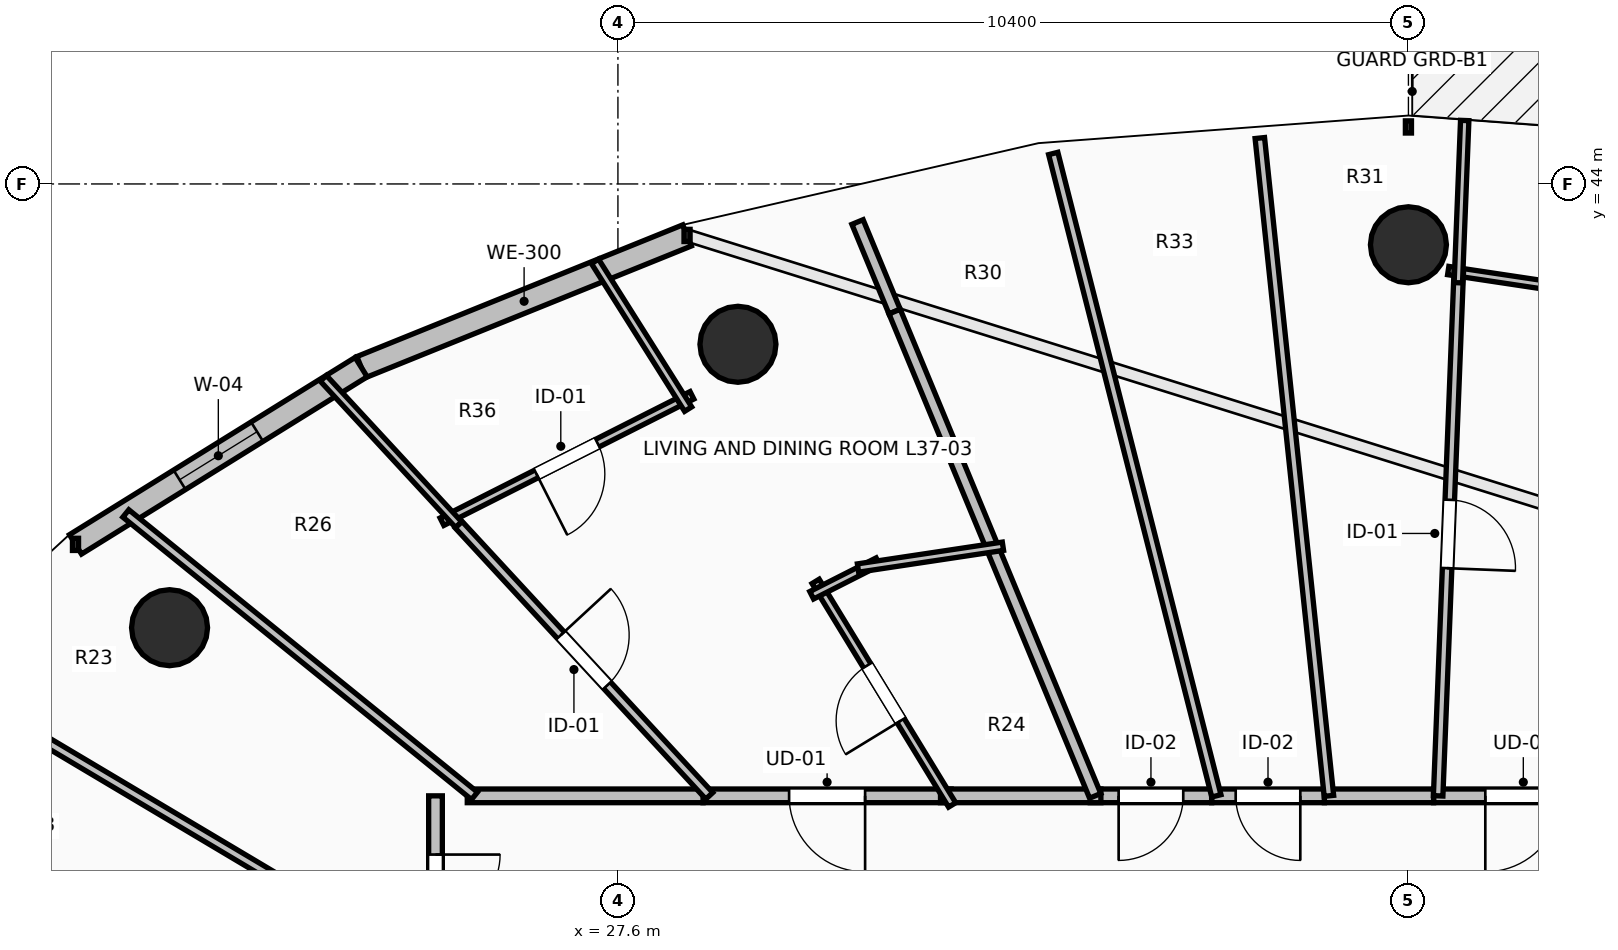
"""IFC4 building model, lengths in metres.
Left out: names, types, materials, properties, quantities, classifications, styles, units other than length and angle.
Written with IfcOpenShell. Run it as: python <this file> out.ifc"""

import sys

from ifc_helpers import new_model, si_unit, direction, frame, frame_2d, origin, origin_2d, place, context, subcontext, project, spatial, rectangle, circle, extrude, element, fill, save


model = new_model("IFC4")
c1 = context("Model", 3, precision=1e-05, world=origin(), true_north=direction((0.0, 1.0)))
c2 = subcontext(c1, "Body", "Model", "MODEL_VIEW")
j1 = project(units=[si_unit("LENGTHUNIT", "METRE"), si_unit("PLANEANGLEUNIT", "RADIAN")], contexts=[c1])
p1 = place(None, origin())
s1 = spatial("IfcSite", under=j1, at=p1, CompositionType="ELEMENT")
p2 = place(p1, origin())
s2 = spatial("IfcBuilding", under=s1, at=p2, CompositionType="ELEMENT")
p3 = place(p2, frame((0.0, 0.0, 139.6)))
s3 = spatial("IfcBuildingStorey", under=s2, at=p3, CompositionType="ELEMENT", Elevation=139.6)
for number, where, z_axis, x_axis in (
    (1, (38.0, 43.2, 0.0), (0.0, 0.0, 1.0), (0.0, 1.0, 0.0)),
    (2, (29.179, 41.891, 0.0), (0.0, 0.0, 1.0), (-0.383, 0.924, 0.0)),
    (3, (21.701, 38.162, 0.0), (0.0, 0.0, 1.0), (-0.707, 0.707, 0.0)),
):
    element("IfcColumn", number, at=place(p3, frame(where, z_axis=z_axis, x_axis=x_axis)), inside=s3, PredefinedType="COLUMN", context=c2, shape_type="SweptSolid", body=[
        extrude(circle(Radius=0.5, at=origin_2d()), origin(), (0.0, 0.0, 1.0), 3.5),
    ])
p4 = place(p3, frame((28.51, 43.323, 0.0), z_axis=(0.0, 0.0, 1.0), x_axis=(-0.927156504392, -0.374674280359, 0.0)))
e4 = element("IfcWall", 4, at=p4, inside=s3, PredefinedType="STANDARD", context=c2, shape_type="SweptSolid", body=[
    extrude(rectangle(XDim=4.625, YDim=0.3, at=frame_2d((2.312, 0.0))), origin(), (0.0, 0.0, 1.0), 3.24),
])
p5 = place(p3, frame((24.222, 41.59, 0.0), z_axis=(0.0, 0.0, 1.0), x_axis=(-0.849721181976, -0.527232313977, 0.0)))
e5 = element("IfcWall", 5, at=p5, inside=s3, PredefinedType="STANDARD", context=c2, shape_type="SweptSolid", body=[
    extrude(rectangle(XDim=4.423, YDim=0.3, at=frame_2d((2.211, 0.0))), origin(), (0.0, 0.0, 1.0), 3.24),
])
p6 = place(p5, frame((1.611, 0.0, 0.85)))
e6 = element("IfcOpeningElement", 6, at=p6, cuts=e5, PredefinedType="OPENING", context=c2, shape_type="SweptSolid", body=[
    extrude(rectangle(XDim=1.2, YDim=1.95, at=frame_2d((0.6, 0.975))), frame((0.0, 0.165, 0.0), z_axis=(0.0, -1.0, 0.0), x_axis=(1.0, 0.0, 0.0)), (0.0, 0.0, 1.0), 0.33),
])
p7 = place(p3, frame((40.692, 35.95, 0.0), z_axis=(0.0, 0.0, 1.0), x_axis=(-1.0, 0.0, 0.0)))
e7 = element("IfcWall", 7, at=p7, inside=s3, PredefinedType="PARTITIONING", context=c2, shape_type="SweptSolid", body=[
    extrude(rectangle(XDim=2.361, YDim=0.18, at=frame_2d((1.18, 0.0))), origin(), (0.0, 0.0, 1.0), 3.24),
])
p8 = place(p7, frame((0.68, 0.0, 0.0)))
e8 = element("IfcOpeningElement", 8, at=p8, cuts=e7, PredefinedType="OPENING", context=c2, shape_type="SweptSolid", body=[
    extrude(rectangle(XDim=1.0, YDim=2.15, at=frame_2d((0.5, 1.075))), frame((0.0, 0.105, 0.0), z_axis=(0.0, -1.0, 0.0), x_axis=(1.0, 0.0, 0.0)), (0.0, 0.0, 1.0), 0.21),
])
p9 = place(p3, frame((38.331, 35.95, 0.0), z_axis=(0.0, 0.0, 1.0), x_axis=(-1.0, 0.0, 0.0)))
e9 = element("IfcWall", 9, at=p9, inside=s3, PredefinedType="PARTITIONING", context=c2, shape_type="SweptSolid", body=[
    extrude(rectangle(XDim=1.437, YDim=0.18, at=frame_2d((0.719, 0.0))), origin(), (0.0, 0.0, 1.0), 3.24),
])
p10 = place(p3, frame((36.894, 35.95, 0.0), z_axis=(0.0, 0.0, 1.0), x_axis=(-1.0, 0.0, 0.0)))
e10 = element("IfcWall", 10, at=p10, inside=s3, PredefinedType="PARTITIONING", context=c2, shape_type="SweptSolid", body=[
    extrude(rectangle(XDim=1.483, YDim=0.18, at=frame_2d((0.742, 0.0))), origin(), (0.0, 0.0, 1.0), 3.24),
])
p11 = place(p10, frame((0.316, 0.0, 0.0)))
e11 = element("IfcOpeningElement", 11, at=p11, cuts=e10, PredefinedType="OPENING", context=c2, shape_type="SweptSolid", body=[
    extrude(rectangle(XDim=0.85, YDim=2.1, at=frame_2d((0.425, 1.05))), frame((0.0, 0.105, 0.0), z_axis=(0.0, -1.0, 0.0), x_axis=(1.0, 0.0, 0.0)), (0.0, 0.0, 1.0), 0.21),
])
p12 = place(p3, frame((35.411, 35.95, 0.0), z_axis=(0.0, 0.0, 1.0), x_axis=(-1.0, 0.0, 0.0)))
e12 = element("IfcWall", 12, at=p12, inside=s3, PredefinedType="PARTITIONING", context=c2, shape_type="SweptSolid", body=[
    extrude(rectangle(XDim=1.597, YDim=0.18, at=frame_2d((0.798, 0.0))), origin(), (0.0, 0.0, 1.0), 3.24),
])
p13 = place(p12, frame((0.374, 0.0, 0.0)))
e13 = element("IfcOpeningElement", 13, at=p13, cuts=e12, PredefinedType="OPENING", context=c2, shape_type="SweptSolid", body=[
    extrude(rectangle(XDim=0.85, YDim=2.1, at=frame_2d((0.425, 1.05))), frame((0.0, 0.105, 0.0), z_axis=(0.0, -1.0, 0.0), x_axis=(1.0, 0.0, 0.0)), (0.0, 0.0, 1.0), 0.21),
])
p14 = place(p3, frame((31.984, 35.95, 0.0), z_axis=(0.0, 0.0, 1.0), x_axis=(-1.0, 0.0, 0.0)))
e14 = element("IfcWall", 14, at=p14, inside=s3, PredefinedType="PARTITIONING", context=c2, shape_type="SweptSolid", body=[
    extrude(rectangle(XDim=3.264, YDim=0.18, at=frame_2d((1.632, 0.0))), origin(), (0.0, 0.0, 1.0), 2.432),
])
p15 = place(p14, frame((1.132, 0.0, 0.0)))
e15 = element("IfcOpeningElement", 15, at=p15, cuts=e14, PredefinedType="OPENING", context=c2, shape_type="SweptSolid", body=[
    extrude(rectangle(XDim=1.0, YDim=2.15, at=frame_2d((0.5, 1.075))), frame((0.0, 0.105, 0.0), z_axis=(0.0, -1.0, 0.0), x_axis=(1.0, 0.0, 0.0)), (0.0, 0.0, 1.0), 0.21),
])
p16 = place(p3, frame((33.954, 35.95, 0.0), z_axis=(0.0, 0.0, 1.0), x_axis=(-1.0, 0.0, 0.0)))
e16 = element("IfcWall", 16, at=p16, inside=s3, PredefinedType="PARTITIONING", context=c2, shape_type="SweptSolid", body=[
    extrude(rectangle(XDim=2.11, YDim=0.18, at=frame_2d((1.055, 0.0))), origin(), (0.0, 0.0, 1.0), 3.24),
])
p17 = place(p3, frame((28.72, 35.95, 0.0), z_axis=(0.0, 0.0, 1.0), x_axis=(-1.0, 0.0, 0.0)))
e17 = element("IfcWall", 17, at=p17, inside=s3, PredefinedType="PARTITIONING", context=c2, shape_type="SweptSolid", body=[
    extrude(rectangle(XDim=3.102, YDim=0.18, at=frame_2d((1.551, 0.0))), origin(), (0.0, 0.0, 1.0), 2.432),
])
p18 = place(p3, frame((25.2, 35.95, 0.0), z_axis=(0.0, 0.0, 1.0), x_axis=(0.0, -1.0, 0.0)))
e18 = element("IfcWall", 18, at=p18, inside=s3, PredefinedType="PARTITIONING", context=c2, shape_type="SweptSolid", body=[
    extrude(rectangle(XDim=2.395, YDim=0.18, at=frame_2d((1.198, 0.0))), origin(), (0.0, 0.0, 1.0), 2.432),
])
p19 = place(p18, frame((0.772, 0.0, 0.0)))
e19 = element("IfcOpeningElement", 19, at=p19, cuts=e18, PredefinedType="OPENING", context=c2, shape_type="SweptSolid", body=[
    extrude(rectangle(XDim=0.85, YDim=2.1, at=frame_2d((0.425, 1.05))), frame((0.0, 0.105, 0.0), z_axis=(0.0, -1.0, 0.0), x_axis=(1.0, 0.0, 0.0)), (0.0, 0.0, 1.0), 0.21),
])
p20 = place(p3, frame((41.854, 42.36, 0.0), z_axis=(0.0, 0.0, 1.0), x_axis=(-0.988887919082, 0.148662986296, 0.0)))
e20 = element("IfcWall", 20, at=p20, inside=s3, PredefinedType="PARTITIONING", context=c2, shape_type="SweptSolid", body=[
    extrude(rectangle(XDim=3.368, YDim=0.11, at=frame_2d((1.684, 0.0))), origin(), (0.0, 0.0, 1.0), 3.24),
])
p21 = place(p20, frame((1.234, 0.0, 0.0)))
e21 = element("IfcOpeningElement", 21, at=p21, cuts=e20, PredefinedType="OPENING", context=c2, shape_type="SweptSolid", body=[
    extrude(rectangle(XDim=0.9, YDim=2.1, at=frame_2d((0.45, 1.05))), frame((0.0, 0.07, 0.0), z_axis=(0.0, -1.0, 0.0), x_axis=(1.0, 0.0, 0.0)), (0.0, 0.0, 1.0), 0.14),
])
p22 = place(p3, frame((38.662, 42.84, 0.0), z_axis=(0.0, 0.0, 1.0), x_axis=(-0.039300632457, -0.999227431713, 0.0)))
e22 = element("IfcWall", 22, at=p22, inside=s3, PredefinedType="PARTITIONING", context=c2, shape_type="SweptSolid", body=[
    extrude(rectangle(XDim=6.896, YDim=0.125, at=frame_2d((3.448, 0.0))), origin(), (0.0, 0.0, 1.0), 2.922),
])
p23 = place(p22, frame((2.998, 0.0, 0.0)))
e23 = element("IfcOpeningElement", 23, at=p23, cuts=e22, PredefinedType="OPENING", context=c2, shape_type="SweptSolid", body=[
    extrude(rectangle(XDim=0.9, YDim=2.1, at=frame_2d((0.45, 1.05))), frame((0.0, 0.077, 0.0), z_axis=(0.0, -1.0, 0.0), x_axis=(1.0, 0.0, 0.0)), (0.0, 0.0, 1.0), 0.155),
])
p24 = place(p3, frame((38.74, 44.835, 0.0), z_axis=(0.0, 0.0, 1.0), x_axis=(-0.039310852952, -0.999227029679, 0.0)))
e24 = element("IfcWall", 24, at=p24, inside=s3, PredefinedType="PARTITIONING", context=c2, shape_type="SweptSolid", body=[
    extrude(rectangle(XDim=2.136, YDim=0.11, at=frame_2d((1.068, 0.0))), origin(), (0.0, 0.0, 1.0), 2.728),
])
p25 = place(p3, frame((36.045, 44.604, 0.0), z_axis=(0.0, 0.0, 1.0), x_axis=(0.104483235172, -0.994526647993, 0.0)))
e25 = element("IfcWall", 25, at=p25, inside=s3, PredefinedType="PARTITIONING", context=c2, shape_type="SweptSolid", body=[
    extrude(rectangle(XDim=8.702, YDim=0.125, at=frame_2d((4.351, 0.0))), origin(), (0.0, 0.0, 1.0), 2.432),
])
p26 = place(p3, frame((33.327, 44.401, 0.0), z_axis=(0.0, 0.0, 1.0), x_axis=(0.246124619458, -0.969238191415, 0.0)))
e26 = element("IfcWall", 26, at=p26, inside=s3, PredefinedType="PARTITIONING", context=c2, shape_type="SweptSolid", body=[
    extrude(rectangle(XDim=8.719, YDim=0.125, at=frame_2d((4.36, 0.0))), origin(), (0.0, 0.0, 1.0), 2.432),
])
p27 = place(p3, frame((30.752, 43.499, 0.0), z_axis=(0.0, 0.0, 1.0), x_axis=(0.382752000821, -0.923851127546, 0.0)))
e27 = element("IfcWall", 27, at=p27, inside=s3, PredefinedType="PARTITIONING", context=c2, shape_type="SweptSolid", body=[
    extrude(rectangle(XDim=1.275, YDim=0.16, at=frame_2d((0.638, 0.0))), origin(), (0.0, 0.0, 1.0), 2.728),
])
p28 = place(p3, frame((31.24, 42.321, 0.0), z_axis=(0.0, 0.0, 1.0), x_axis=(0.382673849319, -0.923883501881, 0.0)))
e28 = element("IfcWall", 28, at=p28, inside=s3, PredefinedType="PARTITIONING", context=c2, shape_type="SweptSolid", body=[
    extrude(rectangle(XDim=6.896, YDim=0.16, at=frame_2d((3.448, 0.0))), origin(), (0.0, 0.0, 1.0), 2.432),
])
p29 = place(p3, frame((31.997, 35.831, 0.0), z_axis=(0.0, 0.0, 1.0), x_axis=(-0.521220733209, 0.853421904613, 0.0)))
e29 = element("IfcWall", 29, at=p29, inside=s3, PredefinedType="PARTITIONING", context=c2, shape_type="SweptSolid", body=[
    extrude(rectangle(XDim=3.446, YDim=0.11, at=frame_2d((1.723, 0.0))), origin(), (0.0, 0.0, 1.0), 2.432),
])
p30 = place(p29, frame((1.298, 0.0, 0.0)))
e30 = element("IfcOpeningElement", 30, at=p30, cuts=e29, PredefinedType="OPENING", context=c2, shape_type="SweptSolid", body=[
    extrude(rectangle(XDim=0.85, YDim=2.1, at=frame_2d((0.425, 1.05))), frame((0.0, 0.07, 0.0), z_axis=(0.0, -1.0, 0.0), x_axis=(1.0, 0.0, 0.0)), (0.0, 0.0, 1.0), 0.14),
])
p31 = place(p3, frame((30.149, 38.589, 0.0), z_axis=(0.0, 0.0, 1.0), x_axis=(0.891868081409, 0.452295617229, 0.0)))
e31 = element("IfcWall", 31, at=p31, inside=s3, PredefinedType="PARTITIONING", context=c2, shape_type="SweptSolid", body=[
    extrude(rectangle(XDim=0.979, YDim=0.11, at=frame_2d((0.489, 0.0))), origin(), (0.0, 0.0, 1.0), 2.922),
])
p32 = place(p3, frame((30.759, 38.947, 0.0), z_axis=(0.0, 0.0, 1.0), x_axis=(0.988889867338, 0.148650026153, 0.0)))
e32 = element("IfcWall", 32, at=p32, inside=s3, PredefinedType="PARTITIONING", context=c2, shape_type="SweptSolid", body=[
    extrude(rectangle(XDim=1.928, YDim=0.11, at=frame_2d((0.964, 0.0))), origin(), (0.0, 0.0, 1.0), 2.922),
])
p33 = place(p3, frame((28.574, 41.219, 0.0), z_axis=(0.0, 0.0, 1.0), x_axis=(-0.892470920122, -0.451104928744, 0.0)))
e33 = element("IfcWall", 33, at=p33, inside=s3, PredefinedType="PARTITIONING", context=c2, shape_type="SweptSolid", body=[
    extrude(rectangle(XDim=3.685, YDim=0.11, at=frame_2d((1.843, 0.0))), origin(), (0.0, 0.0, 1.0), 3.24),
])
p34 = place(p33, frame((1.393, 0.0, 0.0)))
e34 = element("IfcOpeningElement", 34, at=p34, cuts=e33, PredefinedType="OPENING", context=c2, shape_type="SweptSolid", body=[
    extrude(rectangle(XDim=0.9, YDim=2.1, at=frame_2d((0.45, 1.05))), frame((0.0, 0.07, 0.0), z_axis=(0.0, -1.0, 0.0), x_axis=(1.0, 0.0, 0.0)), (0.0, 0.0, 1.0), 0.14),
])
p35 = place(p3, frame((25.505, 39.517, 0.0), z_axis=(0.0, 0.0, 1.0), x_axis=(-0.678720806978, 0.734396395808, 0.0)))
e35 = element("IfcWall", 35, at=p35, inside=s3, PredefinedType="PARTITIONING", context=c2, shape_type="SweptSolid", body=[
    extrude(rectangle(XDim=2.622, YDim=0.11, at=frame_2d((1.311, 0.0))), origin(), (0.0, 0.0, 1.0), 2.728),
])
p36 = place(p3, frame((27.298, 42.981, 0.0), z_axis=(0.0, 0.0, 1.0), x_axis=(0.533261254764, -0.845950609769, 0.0)))
e36 = element("IfcWall", 36, at=p36, inside=s3, PredefinedType="PARTITIONING", context=c2, shape_type="SweptSolid", body=[
    extrude(rectangle(XDim=2.298, YDim=0.11, at=frame_2d((1.149, 0.0))), origin(), (0.0, 0.0, 1.0), 2.728),
])
p37 = place(p3, frame((25.505, 39.517, 0.0), z_axis=(0.0, 0.0, 1.0), x_axis=(0.678766339668, -0.734354312395, 0.0)))
e37 = element("IfcWall", 37, at=p37, inside=s3, PredefinedType="PARTITIONING", context=c2, shape_type="SweptSolid", body=[
    extrude(rectangle(XDim=4.857, YDim=0.125, at=frame_2d((2.429, 0.0))), origin(), (0.0, 0.0, 1.0), 2.432),
])
p38 = place(p37, frame((1.979, 0.0, 0.0)))
e38 = element("IfcOpeningElement", 38, at=p38, cuts=e37, PredefinedType="OPENING", context=c2, shape_type="SweptSolid", body=[
    extrude(rectangle(XDim=0.9, YDim=2.1, at=frame_2d((0.45, 1.05))), frame((0.0, 0.077, 0.0), z_axis=(0.0, -1.0, 0.0), x_axis=(1.0, 0.0, 0.0)), (0.0, 0.0, 1.0), 0.155),
])
p39 = place(p3, frame((21.126, 39.665, 0.0), z_axis=(0.0, 0.0, 1.0), x_axis=(0.777089771819, -0.629389773141, 0.0)))
e39 = element("IfcWall", 39, at=p39, inside=s3, PredefinedType="PARTITIONING", context=c2, shape_type="SweptSolid", body=[
    extrude(rectangle(XDim=5.903, YDim=0.125, at=frame_2d((2.951, 0.0))), origin(), (0.0, 0.0, 1.0), 2.728),
])
p40 = place(p3, frame((18.603, 37.54, 0.0), z_axis=(0.0, 0.0, 1.0), x_axis=(0.859389720334, -0.511321140365, 0.0)))
e40 = element("IfcWall", 40, at=p40, inside=s3, PredefinedType="PARTITIONING", context=c2, shape_type="SweptSolid", body=[
    extrude(rectangle(XDim=7.676, YDim=0.125, at=frame_2d((3.838, 0.0))), origin(), (0.0, 0.0, 1.0), 2.728),
])
p41 = place(p3, frame((16.355, 34.966, 0.0), z_axis=(0.0, 0.0, 1.0), x_axis=(0.923874659351, -0.382695197002, 0.0)))
e41 = element("IfcWall", 41, at=p41, inside=s3, PredefinedType="PARTITIONING", context=c2, shape_type="SweptSolid", body=[
    extrude(rectangle(XDim=4.353, YDim=0.16, at=frame_2d((2.177, 0.0))), origin(), (0.0, 0.0, 1.0), 2.728),
])
p42 = place(p6, origin())
e42 = element("IfcWindow", 42, at=p42, inside=s3, PartitioningType="SINGLE_PANEL", PredefinedType="WINDOW", context=c2, shape_type="SweptSolid", body=[
    extrude(rectangle(XDim=1.2, YDim=1.95, at=frame_2d((0.6, 0.975))), frame((0.0, 0.03, 0.0), z_axis=(0.0, -1.0, 0.0), x_axis=(1.0, 0.0, 0.0)), (0.0, 0.0, 1.0), 0.06),
])
fill(e6, e42)
p43 = place(p8, origin())
e43 = element("IfcDoor", 43, at=p43, inside=s3, OperationType="SINGLE_SWING_RIGHT", PredefinedType="DOOR", context=c2, shape_type="SweptSolid", body=[
    extrude(rectangle(XDim=1.0, YDim=2.15, at=frame_2d((0.5, 1.075))), frame((0.0, 0.025, 0.0), z_axis=(0.0, -1.0, 0.0), x_axis=(1.0, 0.0, 0.0)), (0.0, 0.0, 1.0), 0.05),
])
fill(e8, e43)
p44 = place(p15, origin())
e44 = element("IfcDoor", 44, at=p44, inside=s3, OperationType="SINGLE_SWING_LEFT", PredefinedType="DOOR", context=c2, shape_type="SweptSolid", body=[
    extrude(rectangle(XDim=1.0, YDim=2.15, at=frame_2d((0.5, 1.075))), frame((0.0, 0.025, 0.0), z_axis=(0.0, -1.0, 0.0), x_axis=(1.0, 0.0, 0.0)), (0.0, 0.0, 1.0), 0.05),
])
fill(e15, e44)
p45 = place(p23, origin())
e45 = element("IfcDoor", 45, at=p45, inside=s3, OperationType="SINGLE_SWING_RIGHT", PredefinedType="DOOR", context=c2, shape_type="SweptSolid", body=[
    extrude(rectangle(XDim=0.9, YDim=2.1, at=frame_2d((0.45, 1.05))), frame((0.0, 0.025, 0.0), z_axis=(0.0, -1.0, 0.0), x_axis=(1.0, 0.0, 0.0)), (0.0, 0.0, 1.0), 0.05),
])
fill(e23, e45)
p46 = place(p30, origin())
e46 = element("IfcDoor", 46, at=p46, inside=s3, OperationType="SINGLE_SWING_LEFT", PredefinedType="DOOR", context=c2, shape_type="SweptSolid", body=[
    extrude(rectangle(XDim=0.85, YDim=2.1, at=frame_2d((0.425, 1.05))), frame((0.0, 0.025, 0.0), z_axis=(0.0, -1.0, 0.0), x_axis=(1.0, 0.0, 0.0)), (0.0, 0.0, 1.0), 0.05),
])
fill(e30, e46)
p47 = place(p34, origin())
e47 = element("IfcDoor", 47, at=p47, inside=s3, OperationType="SINGLE_SWING_RIGHT", PredefinedType="DOOR", context=c2, shape_type="SweptSolid", body=[
    extrude(rectangle(XDim=0.9, YDim=2.1, at=frame_2d((0.45, 1.05))), frame((0.0, 0.025, 0.0), z_axis=(0.0, -1.0, 0.0), x_axis=(1.0, 0.0, 0.0)), (0.0, 0.0, 1.0), 0.05),
])
fill(e34, e47)
p48 = place(p38, origin())
e48 = element("IfcDoor", 48, at=p48, inside=s3, OperationType="SINGLE_SWING_LEFT", PredefinedType="DOOR", context=c2, shape_type="SweptSolid", body=[
    extrude(rectangle(XDim=0.9, YDim=2.1, at=frame_2d((0.45, 1.05))), frame((0.0, 0.025, 0.0), z_axis=(0.0, -1.0, 0.0), x_axis=(1.0, 0.0, 0.0)), (0.0, 0.0, 1.0), 0.05),
])
fill(e38, e48)
p49 = place(p11, origin())
e49 = element("IfcDoor", 49, at=p49, inside=s3, OperationType="SINGLE_SWING_LEFT", PredefinedType="DOOR", context=c2, shape_type="SweptSolid", body=[
    extrude(rectangle(XDim=0.85, YDim=2.1, at=frame_2d((0.425, 1.05))), frame((0.0, 0.025, 0.0), z_axis=(0.0, -1.0, 0.0), x_axis=(1.0, 0.0, 0.0)), (0.0, 0.0, 1.0), 0.05),
])
fill(e11, e49)
p50 = place(p13, origin())
e50 = element("IfcDoor", 50, at=p50, inside=s3, OperationType="SINGLE_SWING_RIGHT", PredefinedType="DOOR", context=c2, shape_type="SweptSolid", body=[
    extrude(rectangle(XDim=0.85, YDim=2.1, at=frame_2d((0.425, 1.05))), frame((0.0, 0.025, 0.0), z_axis=(0.0, -1.0, 0.0), x_axis=(1.0, 0.0, 0.0)), (0.0, 0.0, 1.0), 0.05),
])
fill(e13, e50)
p51 = place(p19, origin())
e51 = element("IfcDoor", 51, at=p51, inside=s3, OperationType="SINGLE_SWING_LEFT", PredefinedType="DOOR", context=c2, shape_type="SweptSolid", body=[
    extrude(rectangle(XDim=0.85, YDim=2.1, at=frame_2d((0.425, 1.05))), frame((0.0, 0.025, 0.0), z_axis=(0.0, -1.0, 0.0), x_axis=(1.0, 0.0, 0.0)), (0.0, 0.0, 1.0), 0.05),
])
fill(e19, e51)
save(model, sys.argv[1])
